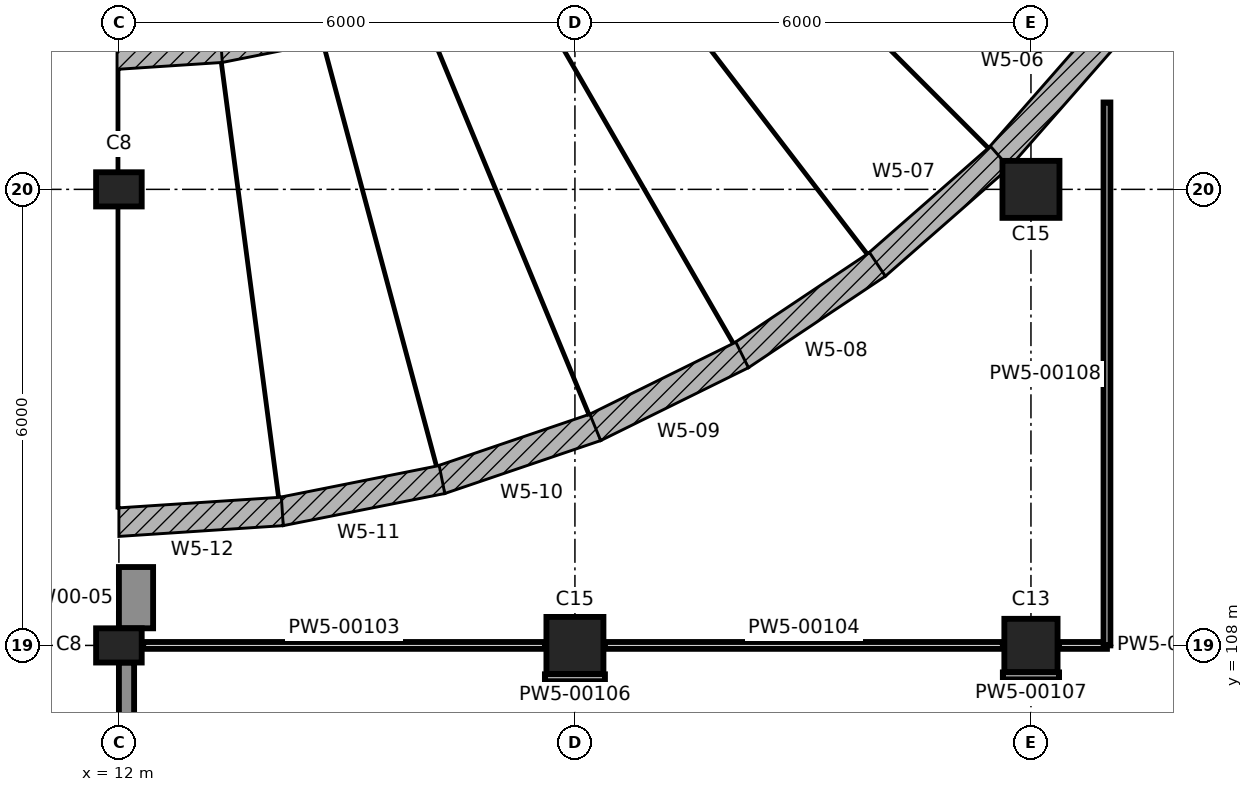
"""IFC4 building model, lengths in metres.
Left out: names, types, materials, properties, quantities, classifications, styles, units other than length and angle.
Written with IfcOpenShell. Run it as: python <this file> out.ifc"""

import sys

from ifc_helpers import new_model, si_unit, direction, frame, frame_2d, origin, origin_2d, place, context, subcontext, project, spatial, polyline, rectangle, outline, extrude, element, fill, save


model = new_model("IFC4")
c1 = context("Model", 3, precision=1e-05, world=origin(), true_north=direction((0.0, 1.0)))
c2 = subcontext(c1, "Body", "Model", "MODEL_VIEW")
j1 = project(units=[si_unit("LENGTHUNIT", "METRE"), si_unit("PLANEANGLEUNIT", "RADIAN")], contexts=[c1])
p1 = place(None, origin())
s1 = spatial("IfcSite", under=j1, at=p1, CompositionType="ELEMENT")
p2 = place(p1, origin())
s2 = spatial("IfcBuilding", under=s1, at=p2, CompositionType="ELEMENT")
p3 = place(p2, origin())
s3 = spatial("IfcBuildingStorey", under=s2, at=p3, CompositionType="ELEMENT", Elevation=0.0)
p4 = place(p3, frame((12.0, 108.0, -0.3), z_axis=(0.0, 0.0, 1.0), x_axis=(1.0, 0.0, 0.0)))
e1 = element("IfcColumn", 1, at=p4, inside=s3, PredefinedType="COLUMN", context=c2, shape_type="SweptSolid", body=[
    extrude(rectangle(XDim=0.6, YDim=0.45, at=origin_2d()), origin(), (0.0, 0.0, 1.0), 7.3),
])
p5 = place(p3, frame((18.0, 108.0, -0.3), z_axis=(0.0, 0.0, 1.0), x_axis=(1.0, 0.0, 0.0)))
e2 = element("IfcColumn", 2, at=p5, inside=s3, PredefinedType="COLUMN", context=c2, shape_type="SweptSolid", body=[
    extrude(rectangle(XDim=0.75, YDim=0.75, at=origin_2d()), origin(), (0.0, 0.0, 1.0), 7.3),
])
p6 = place(p3, frame((24.0, 108.0, -0.3), z_axis=(0.0, 0.0, 1.0), x_axis=(1.0, 0.0, 0.0)))
e3 = element("IfcColumn", 3, at=p6, inside=s3, PredefinedType="COLUMN", context=c2, shape_type="SweptSolid", body=[
    extrude(rectangle(XDim=0.7, YDim=0.7, at=origin_2d()), origin(), (0.0, 0.0, 1.0), 7.3),
])
p7 = place(p3, frame((12.0, 114.0, -0.3), z_axis=(0.0, 0.0, 1.0), x_axis=(1.0, 0.0, 0.0)))
e4 = element("IfcColumn", 4, at=p7, inside=s3, PredefinedType="COLUMN", context=c2, shape_type="SweptSolid", body=[
    extrude(rectangle(XDim=0.6, YDim=0.45, at=origin_2d()), origin(), (0.0, 0.0, 1.0), 7.3),
])
p8 = place(p3, frame((24.0, 114.0, -0.3), z_axis=(0.0, 0.0, 1.0), x_axis=(1.0, 0.0, 0.0)))
e5 = element("IfcColumn", 5, at=p8, inside=s3, PredefinedType="COLUMN", context=c2, shape_type="SweptSolid", body=[
    extrude(rectangle(XDim=0.75, YDim=0.75, at=origin_2d()), origin(), (0.0, 0.0, 1.0), 7.3),
])
p9 = place(p3, frame((26.346, 117.717, -0.3), z_axis=(0.623441381436, -0.416561116022, 0.661662814832), x_axis=(-0.555582904203, -0.831461145053, 2.8701608e-05)))
e6 = element("IfcWall", 6, at=p9, inside=s3, PredefinedType="SOLIDWALL", context=c2, shape_type="SweptSolid", body=[
    extrude(outline(polyline([(0.0, 0.0), (2.167, 0.0), (1.765, -9.269), (0.402, -9.269), (0.0, 0.0)])), origin(), (-1.565e-05, 0.662, 0.75), 0.667),
])
p10 = place(p3, frame((25.142, 115.915, -0.3), z_axis=(0.563727278577, -0.494389341921, 0.6616575655), x_axis=(-0.659349875833, -0.751836246232, -9.545532e-06)))
e7 = element("IfcWall", 7, at=p10, inside=s3, PredefinedType="SOLIDWALL", context=c2, shape_type="SweptSolid", body=[
    extrude(outline(polyline([(0.0, 0.0), (2.167, 0.0), (1.765, -9.269), (0.402, -9.269), (0.0, 0.0)])), origin(), (-5.389e-06, 0.662, 0.75), 0.667),
])
p11 = place(p3, frame((23.713, 114.286, -0.3), z_axis=(0.494389341921, -0.563727278577, 0.6616575655), x_axis=(-0.751836246232, -0.659349875833, 9.545532e-06)))
e8 = element("IfcWall", 8, at=p11, inside=s3, PredefinedType="SOLIDWALL", context=c2, shape_type="SweptSolid", body=[
    extrude(outline(polyline([(0.0, 0.0), (2.167, 0.0), (1.765, -9.269), (0.402, -9.269), (0.0, 0.0)])), origin(), (5.389e-06, 0.662, 0.75), 0.667),
])
p12 = place(p3, frame((22.084, 112.857, -0.3), z_axis=(0.416561116022, -0.623441381436, 0.661662814832), x_axis=(-0.831461145053, -0.555582904203, -2.8701608e-05)))
e9 = element("IfcWall", 9, at=p12, inside=s3, PredefinedType="SOLIDWALL", context=c2, shape_type="SweptSolid", body=[
    extrude(outline(polyline([(0.0, 0.0), (2.167, 0.0), (1.765, -9.269), (0.402, -9.269), (0.0, 0.0)])), origin(), (1.565e-05, 0.662, 0.75), 0.667),
])
p13 = place(p3, frame((20.283, 111.654, -0.3), z_axis=(0.331623051487, -0.67247802402, 0.661664158719), x_axis=(-0.896883210339, -0.442267460576, 1.8134674e-05)))
e10 = element("IfcWall", 10, at=p13, inside=s3, PredefinedType="SOLIDWALL", context=c2, shape_type="SweptSolid", body=[
    extrude(outline(polyline([(0.0, 0.0), (2.167, -1.11e-16), (1.765, -9.269), (0.402, -9.269), (0.0, 0.0)])), origin(), (-2.383e-05, 0.662, 0.75), 0.667),
])
p14 = place(p3, frame((18.339, 110.695, -0.3), z_axis=(0.241022741766, -0.710000727249, 0.661669861228), x_axis=(-0.946914536157, -0.321485395559, -4.0695407e-05)))
e11 = element("IfcWall", 11, at=p14, inside=s3, PredefinedType="SOLIDWALL", context=c2, shape_type="SweptSolid", body=[
    extrude(outline(polyline([(0.0, 0.0), (2.167, 1.11e-16), (1.764, -9.269), (0.401, -9.269), (0.0, 0.0)])), origin(), (4.89e-05, 0.662, 0.75), 0.667),
])
p15 = place(p3, frame((16.287, 109.999, -0.3), z_axis=(0.146257877538, -0.73538668284, 0.661675947847), x_axis=(-0.980793118363, -0.195050913102, 1.6436784e-05)))
e12 = element("IfcWall", 12, at=p15, inside=s3, PredefinedType="SOLIDWALL", context=c2, shape_type="SweptSolid", body=[
    extrude(outline(polyline([(0.0, 0.0), (2.167, 5.551e-17), (1.765, -9.269), (0.402, -9.269), (0.0, 0.0)])), origin(), (-3.992e-05, 0.662, 0.75), 0.667),
])
p16 = place(p3, frame((14.162, 109.576, -0.3), z_axis=(0.049059370702, -0.748181333112, 0.661678071972), x_axis=(-0.997856134421, -0.065445662351, -1.6668073e-05)))
e13 = element("IfcWall", 13, at=p16, inside=s3, PredefinedType="SOLIDWALL", context=c2, shape_type="SweptSolid", body=[
    extrude(outline(polyline([(0.0, 0.0), (2.167, 1.388e-17), (1.764, -9.269), (0.401, -9.269), (0.0, 0.0)])), origin(), (4.276e-05, 0.662, 0.75), 0.667),
])
p17 = place(p3, frame((12.1, 102.0, 0.0), z_axis=(0.0, 0.0, 1.0), x_axis=(0.0, 1.0, 0.0)))
e14 = element("IfcWall", 14, at=p17, inside=s3, PredefinedType="SOLIDWALL", context=c2, shape_type="SweptSolid", body=[
    extrude(rectangle(XDim=5.775, YDim=0.2, at=frame_2d((2.887, 0.0))), origin(), (0.0, 0.0, 1.0), 6.15),
])
p18 = place(p17, frame((2.07, 0.0, 0.0)))
e15 = element("IfcOpeningElement", 15, at=p18, cuts=e14, PredefinedType="OPENING", context=c2, shape_type="SweptSolid", body=[
    extrude(rectangle(XDim=1.8, YDim=2.4, at=frame_2d((0.9, 1.2))), frame((0.0, 0.11, 0.0), z_axis=(0.0, -1.0, 0.0), x_axis=(1.0, 0.0, 0.0)), (0.0, 0.0, 1.0), 0.22),
])
p19 = place(p17, frame((2.07, 0.0, 2.5)))
e16 = element("IfcOpeningElement", 16, at=p19, cuts=e14, PredefinedType="OPENING", context=c2, shape_type="SweptSolid", body=[
    extrude(rectangle(XDim=1.8, YDim=3.3, at=frame_2d((0.9, 1.65))), frame((0.0, 0.11, 0.0), z_axis=(0.0, -1.0, 0.0), x_axis=(1.0, 0.0, 0.0)), (0.0, 0.0, 1.0), 0.22),
])
p20 = place(p17, frame((0.2, 0.0, 0.1)))
e17 = element("IfcOpeningElement", 17, at=p20, cuts=e14, PredefinedType="OPENING", context=c2, shape_type="SweptSolid", body=[
    extrude(rectangle(XDim=1.87, YDim=5.7, at=frame_2d((0.935, 2.85))), frame((0.0, 0.11, 0.0), z_axis=(0.0, -1.0, 0.0), x_axis=(1.0, 0.0, 0.0)), (0.0, 0.0, 1.0), 0.22),
])
p21 = place(p17, frame((3.87, 0.0, 0.1)))
e18 = element("IfcOpeningElement", 18, at=p21, cuts=e14, PredefinedType="OPENING", context=c2, shape_type="SweptSolid", body=[
    extrude(rectangle(XDim=1.705, YDim=5.7, at=frame_2d((0.853, 2.85))), frame((0.0, 0.11, 0.0), z_axis=(0.0, -1.0, 0.0), x_axis=(1.0, 0.0, 0.0)), (0.0, 0.0, 1.0), 0.22),
])
p22 = place(p3, frame((12.225, 108.225, 0.0), z_axis=(0.0, 0.0, 1.0), x_axis=(0.0, 1.0, 0.0)))
e19 = element("IfcWall", 19, at=p22, inside=s3, PredefinedType="SOLIDWALL", context=c2, shape_type="SweptSolid", body=[
    extrude(rectangle(XDim=0.806, YDim=0.45, at=frame_2d((0.403, 0.0))), origin(), (0.0, 0.0, 1.0), 6.65),
])
p23 = place(p3, frame((12.32, 108.0, 0.0), z_axis=(0.0, 0.0, 1.0), x_axis=(1.0, 0.0, 0.0)))
e20 = element("IfcWall", 20, at=p23, inside=s3, PredefinedType="PARTITIONING", context=c2, shape_type="SweptSolid", body=[
    extrude(rectangle(XDim=5.285, YDim=0.09, at=frame_2d((2.643, 0.0))), origin(), (0.0, 0.0, 1.0), 6.05),
])
p24 = place(p3, frame((18.395, 108.0, 0.0), z_axis=(0.0, 0.0, 1.0), x_axis=(1.0, 0.0, 0.0)))
e21 = element("IfcWall", 21, at=p24, inside=s3, PredefinedType="PARTITIONING", context=c2, shape_type="SweptSolid", body=[
    extrude(rectangle(XDim=5.235, YDim=0.09, at=frame_2d((2.617, 0.0))), origin(), (0.0, 0.0, 1.0), 6.05),
])
p25 = place(p24, frame((0.155, 0.0, 0.0)))
e22 = element("IfcOpeningElement", 22, at=p25, cuts=e21, PredefinedType="OPENING", context=c2, shape_type="SweptSolid", body=[
    extrude(rectangle(XDim=0.92, YDim=2.04, at=frame_2d((0.46, 1.02))), frame((0.0, 0.055, 0.0), z_axis=(0.0, -1.0, 0.0), x_axis=(1.0, 0.0, 0.0)), (0.0, 0.0, 1.0), 0.11),
])
p26 = place(p3, frame((24.37, 108.0, 0.0), z_axis=(0.0, 0.0, 1.0), x_axis=(1.0, 0.0, 0.0)))
e23 = element("IfcWall", 23, at=p26, inside=s3, PredefinedType="PARTITIONING", context=c2, shape_type="SweptSolid", body=[
    extrude(rectangle(XDim=0.63, YDim=0.09, at=frame_2d((0.315, 0.0))), origin(), (0.0, 0.0, 1.0), 2.75),
])
p27 = place(p3, frame((17.605, 107.575, 0.0), z_axis=(0.0, 0.0, 1.0), x_axis=(1.0, 0.0, 0.0)))
e24 = element("IfcWall", 24, at=p27, inside=s3, PredefinedType="PARTITIONING", context=c2, shape_type="SweptSolid", body=[
    extrude(rectangle(XDim=0.79, YDim=0.09, at=frame_2d((0.395, 0.0))), origin(), (0.0, 0.0, 1.0), 6.15),
])
p28 = place(p3, frame((23.63, 107.6, 0.0), z_axis=(0.0, 0.0, 1.0), x_axis=(1.0, 0.0, 0.0)))
e25 = element("IfcWall", 25, at=p28, inside=s3, PredefinedType="PARTITIONING", context=c2, shape_type="SweptSolid", body=[
    extrude(rectangle(XDim=0.74, YDim=0.09, at=frame_2d((0.37, 0.0))), origin(), (0.0, 0.0, 1.0), 2.75),
])
p29 = place(p3, frame((25.0, 108.0, 0.0), z_axis=(0.0, 0.0, 1.0), x_axis=(0.0, 1.0, 0.0)))
e26 = element("IfcWall", 26, at=p29, inside=s3, PredefinedType="PARTITIONING", context=c2, shape_type="SweptSolid", body=[
    extrude(rectangle(XDim=7.143, YDim=0.09, at=frame_2d((3.572, 0.0))), origin(), (0.0, 0.0, 1.0), 2.75),
])
p30 = place(p21, origin())
e27 = element("IfcWindow", 27, at=p30, inside=s3, PartitioningType="SINGLE_PANEL", PredefinedType="WINDOW", context=c2, shape_type="SweptSolid", body=[
    extrude(rectangle(XDim=1.705, YDim=5.7, at=frame_2d((0.853, 2.85))), frame((0.0, 0.03, 0.0), z_axis=(0.0, -1.0, 0.0), x_axis=(1.0, 0.0, 0.0)), (0.0, 0.0, 1.0), 0.06),
])
fill(e18, e27)
p31 = place(p25, origin())
e28 = element("IfcDoor", 28, at=p31, inside=s3, OperationType="SINGLE_SWING_RIGHT", PredefinedType="DOOR", context=c2, shape_type="SweptSolid", body=[
    extrude(rectangle(XDim=0.92, YDim=2.04, at=frame_2d((0.46, 1.02))), frame((0.0, 0.025, 0.0), z_axis=(0.0, -1.0, 0.0), x_axis=(1.0, 0.0, 0.0)), (0.0, 0.0, 1.0), 0.05),
])
fill(e22, e28)
save(model, sys.argv[1])
